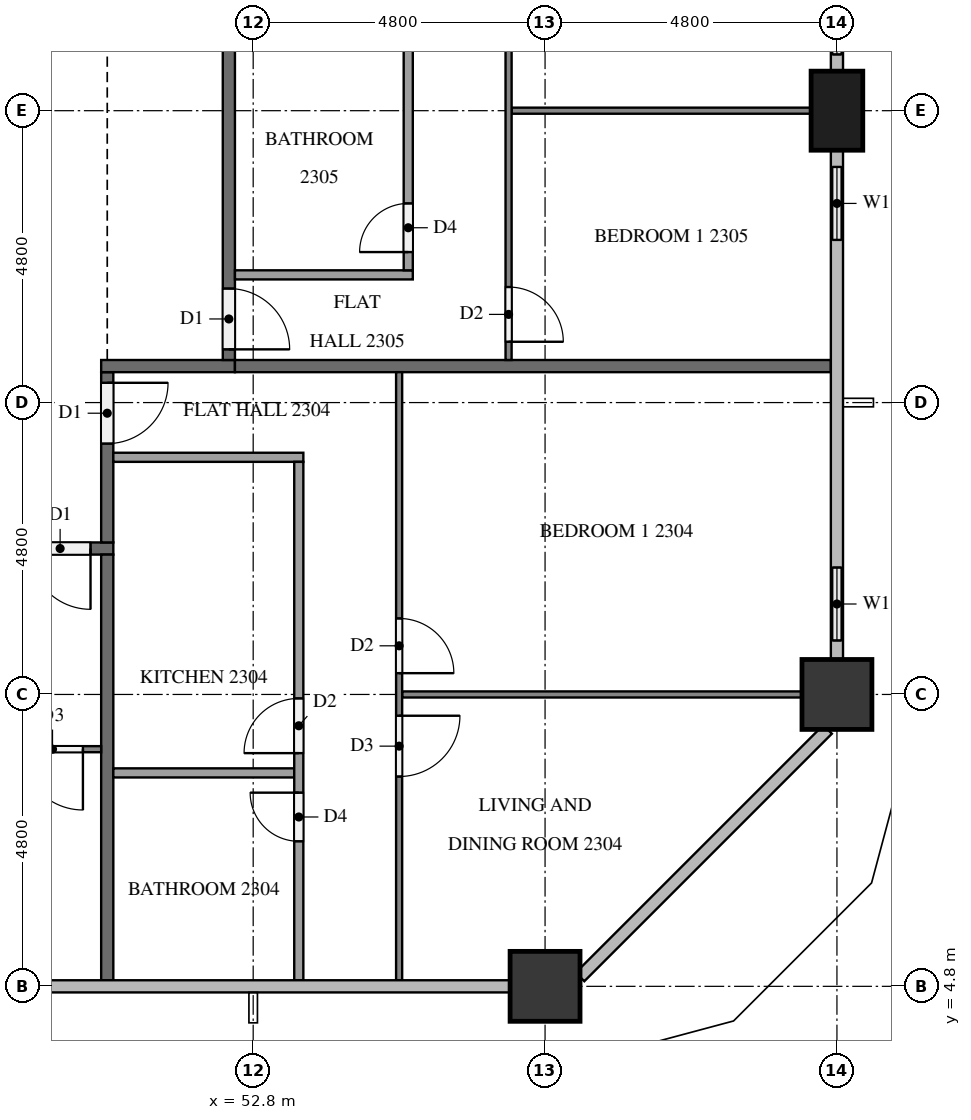
"""IFC4 building model, lengths in metres.
Left out: names, types, materials, properties, quantities, classifications, styles, units other than length and angle.
Written with IfcOpenShell. Run it as: python <this file> out.ifc"""

import sys

from ifc_helpers import new_model, si_unit, direction, frame, frame_2d, origin, origin_2d, place, context, subcontext, project, spatial, rectangle, extrude, element, fill, save


model = new_model("IFC4")
c1 = context("Model", 3, precision=1e-05, world=origin(), true_north=direction((0.0, 1.0)))
c2 = subcontext(c1, "Body", "Model", "MODEL_VIEW")
j1 = project(units=[si_unit("LENGTHUNIT", "METRE"), si_unit("PLANEANGLEUNIT", "RADIAN")], contexts=[c1])
p1 = place(None, origin())
s1 = spatial("IfcSite", under=j1, at=p1, CompositionType="ELEMENT")
p2 = place(p1, origin())
s2 = spatial("IfcBuilding", under=s1, at=p2, CompositionType="ELEMENT")
p3 = place(p2, frame((0.0, 0.0, 92.7)))
s3 = spatial("IfcBuildingStorey", under=s2, at=p3, CompositionType="ELEMENT", Elevation=92.7)
for number, where, z_axis, x_axis in (
    (1, (57.6, 4.8, 0.0), (0.0, 0.0, 1.0), (1.0, 0.0, 0.0)),
    (2, (62.4, 9.6, 0.0), (0.0, 0.0, 1.0), (1.0, 0.0, 0.0)),
):
    element("IfcColumn", number, at=place(p3, frame(where, z_axis=z_axis, x_axis=x_axis)), inside=s3, PredefinedType="COLUMN", context=c2, shape_type="SweptSolid", body=[
        extrude(rectangle(XDim=1.15, YDim=1.15, at=origin_2d()), origin(), (0.0, 0.0, 1.0), 3.2),
    ])
p4 = place(p3, frame((62.4, 19.2, 0.0), z_axis=(0.0, 0.0, 1.0), x_axis=(0.0, 1.0, 0.0)))
e3 = element("IfcColumn", 3, at=p4, inside=s3, PredefinedType="COLUMN", context=c2, shape_type="SweptSolid", body=[
    extrude(rectangle(XDim=1.3, YDim=0.85, at=origin_2d()), origin(), (0.0, 0.0, 1.0), 3.2),
])
p5 = place(p3, frame((62.4, 10.175, 0.0), z_axis=(0.0, 0.0, 1.0), x_axis=(0.0, 1.0, 0.0)))
e4 = element("IfcWall", 4, at=p5, inside=s3, PredefinedType="SOLIDWALL", context=c2, shape_type="SweptSolid", body=[
    extrude(rectangle(XDim=1.825, YDim=0.15, at=frame_2d((0.913, 0.0))), origin(), (0.0, 0.0, 1.0), 3.2),
])
p6 = place(p5, frame((0.312, 0.0, 0.9)))
e5 = element("IfcOpeningElement", 5, at=p6, cuts=e4, PredefinedType="OPENING", context=c2, shape_type="SweptSolid", body=[
    extrude(rectangle(XDim=1.2, YDim=1.4, at=frame_2d((0.6, 0.7))), frame((0.0, 0.085, 0.0), z_axis=(0.0, -1.0, 0.0), x_axis=(1.0, 0.0, 0.0)), (0.0, 0.0, 1.0), 0.17),
])
p7 = place(p3, frame((62.4, 16.8, 0.0), z_axis=(0.0, 0.0, 1.0), x_axis=(0.0, 1.0, 0.0)))
e6 = element("IfcWall", 6, at=p7, inside=s3, PredefinedType="SOLIDWALL", context=c2, shape_type="SweptSolid", body=[
    extrude(rectangle(XDim=1.75, YDim=0.15, at=frame_2d((0.875, 0.0))), origin(), (0.0, 0.0, 1.0), 3.2),
])
p8 = place(p7, frame((0.275, 0.0, 0.9)))
e7 = element("IfcOpeningElement", 7, at=p8, cuts=e6, PredefinedType="OPENING", context=c2, shape_type="SweptSolid", body=[
    extrude(rectangle(XDim=1.2, YDim=1.4, at=frame_2d((0.6, 0.7))), frame((0.0, 0.085, 0.0), z_axis=(0.0, -1.0, 0.0), x_axis=(1.0, 0.0, 0.0)), (0.0, 0.0, 1.0), 0.17),
])
p9 = place(p3, frame((62.4, 19.85, 0.0), z_axis=(0.0, 0.0, 1.0), x_axis=(0.0, 1.0, 0.0)))
e8 = element("IfcWall", 8, at=p9, inside=s3, PredefinedType="SOLIDWALL", context=c2, shape_type="SweptSolid", body=[
    extrude(rectangle(XDim=1.75, YDim=0.15, at=frame_2d((0.875, 0.0))), origin(), (0.0, 0.0, 1.0), 3.2),
])
p10 = place(p9, frame((0.275, 0.0, 0.9)))
e9 = element("IfcOpeningElement", 9, at=p10, cuts=e8, PredefinedType="OPENING", context=c2, shape_type="SweptSolid", body=[
    extrude(rectangle(XDim=1.2, YDim=1.4, at=frame_2d((0.6, 0.7))), frame((0.0, 0.085, 0.0), z_axis=(0.0, -1.0, 0.0), x_axis=(1.0, 0.0, 0.0)), (0.0, 0.0, 1.0), 0.17),
])
p11 = place(p3, frame((50.5, 12.0, 0.0), z_axis=(0.0, 0.0, 1.0), x_axis=(-1.0, 0.0, 0.0)))
e10 = element("IfcWall", 10, at=p11, inside=s3, PredefinedType="PARTITIONING", context=c2, shape_type="SweptSolid", body=[
    extrude(rectangle(XDim=38.6, YDim=0.2, at=frame_2d((19.3, 0.0))), origin(), (0.0, 0.0, 1.0), 3.2),
])
p12 = place(p11, frame((21.975, 0.0, 0.0)))
e11 = element("IfcOpeningElement", 11, at=p12, cuts=e10, PredefinedType="OPENING", context=c2, shape_type="SweptSolid", body=[
    extrude(rectangle(XDim=1.0, YDim=2.1, at=frame_2d((0.5, 1.05))), frame((0.0, 0.11, 0.0), z_axis=(0.0, -1.0, 0.0), x_axis=(1.0, 0.0, 0.0)), (0.0, 0.0, 1.0), 0.22),
])
p13 = place(p11, frame((7.575, 0.0, 0.0)))
e12 = element("IfcOpeningElement", 12, at=p13, cuts=e10, PredefinedType="OPENING", context=c2, shape_type="SweptSolid", body=[
    extrude(rectangle(XDim=1.0, YDim=2.1, at=frame_2d((0.5, 1.05))), frame((0.0, 0.11, 0.0), z_axis=(0.0, -1.0, 0.0), x_axis=(1.0, 0.0, 0.0)), (0.0, 0.0, 1.0), 0.22),
])
p14 = place(p11, frame((0.375, 0.0, 0.0)))
e13 = element("IfcOpeningElement", 13, at=p14, cuts=e10, PredefinedType="OPENING", context=c2, shape_type="SweptSolid", body=[
    extrude(rectangle(XDim=1.0, YDim=2.1, at=frame_2d((0.5, 1.05))), frame((0.0, 0.11, 0.0), z_axis=(0.0, -1.0, 0.0), x_axis=(1.0, 0.0, 0.0)), (0.0, 0.0, 1.0), 0.22),
])
p15 = place(p3, frame((50.4, 14.9, 0.0), z_axis=(0.0, 0.0, 1.0), x_axis=(0.0, -1.0, 0.0)))
e14 = element("IfcWall", 14, at=p15, inside=s3, PredefinedType="PARTITIONING", context=c2, shape_type="SweptSolid", body=[
    extrude(rectangle(XDim=2.8, YDim=0.2, at=frame_2d((1.4, 0.0))), origin(), (0.0, 0.0, 1.0), 3.2),
])
p16 = place(p15, frame((0.175, 0.0, 0.0)))
e15 = element("IfcOpeningElement", 15, at=p16, cuts=e14, PredefinedType="OPENING", context=c2, shape_type="SweptSolid", body=[
    extrude(rectangle(XDim=1.0, YDim=2.1, at=frame_2d((0.5, 1.05))), frame((0.0, 0.11, 0.0), z_axis=(0.0, -1.0, 0.0), x_axis=(1.0, 0.0, 0.0)), (0.0, 0.0, 1.0), 0.22),
])
p17 = place(p3, frame((50.3, 15.0, 0.0), z_axis=(0.0, 0.0, 1.0), x_axis=(1.0, 0.0, 0.0)))
e16 = element("IfcWall", 16, at=p17, inside=s3, PredefinedType="PARTITIONING", context=c2, shape_type="SweptSolid", body=[
    extrude(rectangle(XDim=2.2, YDim=0.2, at=frame_2d((1.1, 0.0))), origin(), (0.0, 0.0, 1.0), 3.2),
])
p18 = place(p3, frame((52.4, 37.7, 0.0), z_axis=(0.0, 0.0, 1.0), x_axis=(0.0, -1.0, 0.0)))
e17 = element("IfcWall", 17, at=p18, inside=s3, PredefinedType="PARTITIONING", context=c2, shape_type="SweptSolid", body=[
    extrude(rectangle(XDim=22.6, YDim=0.2, at=frame_2d((11.3, 0.0))), origin(), (0.0, 0.0, 1.0), 3.2),
])
p19 = place(p18, frame((21.425, 0.0, 0.0)))
e18 = element("IfcOpeningElement", 18, at=p19, cuts=e17, PredefinedType="OPENING", context=c2, shape_type="SweptSolid", body=[
    extrude(rectangle(XDim=1.0, YDim=2.1, at=frame_2d((0.5, 1.05))), frame((0.0, 0.11, 0.0), z_axis=(0.0, -1.0, 0.0), x_axis=(1.0, 0.0, 0.0)), (0.0, 0.0, 1.0), 0.22),
])
p20 = place(p18, frame((0.175, 0.0, 0.0)))
e19 = element("IfcOpeningElement", 19, at=p20, cuts=e17, PredefinedType="OPENING", context=c2, shape_type="SweptSolid", body=[
    extrude(rectangle(XDim=1.0, YDim=2.1, at=frame_2d((0.5, 1.05))), frame((0.0, 0.11, 0.0), z_axis=(0.0, -1.0, 0.0), x_axis=(1.0, 0.0, 0.0)), (0.0, 0.0, 1.0), 0.22),
])
p21 = place(p3, frame((50.4, 11.9, 0.0), z_axis=(0.0, 0.0, 1.0), x_axis=(0.0, -1.0, 0.0)))
e20 = element("IfcWall", 20, at=p21, inside=s3, PredefinedType="PARTITIONING", context=c2, shape_type="SweptSolid", body=[
    extrude(rectangle(XDim=7.0, YDim=0.2, at=frame_2d((3.5, 0.0))), origin(), (0.0, 0.0, 1.0), 3.2),
])
p22 = place(p3, frame((52.5, 15.0, 0.0), z_axis=(0.0, 0.0, 1.0), x_axis=(1.0, 0.0, 0.0)))
e21 = element("IfcWall", 21, at=p22, inside=s3, PredefinedType="PARTITIONING", context=c2, shape_type="SweptSolid", body=[
    extrude(rectangle(XDim=9.8, YDim=0.2, at=frame_2d((4.9, 0.0))), origin(), (0.0, 0.0, 1.0), 3.2),
])
p23 = place(p3, frame((50.3, 8.7, 0.0), z_axis=(0.0, 0.0, 1.0), x_axis=(-1.0, 0.0, 0.0)))
e22 = element("IfcWall", 22, at=p23, inside=s3, PredefinedType="PARTITIONING", context=c2, shape_type="SweptSolid", body=[
    extrude(rectangle(XDim=7.0, YDim=0.1, at=frame_2d((3.5, 0.0))), origin(), (0.0, 0.0, 1.0), 3.2),
])
p24 = place(p23, frame((0.3, 0.0, 0.0)))
e23 = element("IfcOpeningElement", 23, at=p24, cuts=e22, PredefinedType="OPENING", context=c2, shape_type="SweptSolid", body=[
    extrude(rectangle(XDim=1.0, YDim=2.1, at=frame_2d((0.5, 1.05))), frame((0.0, 0.06, 0.0), z_axis=(0.0, -1.0, 0.0), x_axis=(1.0, 0.0, 0.0)), (0.0, 0.0, 1.0), 0.12),
])
p25 = place(p3, frame((55.25, 9.6, 0.0), z_axis=(0.0, 0.0, 1.0), x_axis=(1.0, 0.0, 0.0)))
e24 = element("IfcWall", 24, at=p25, inside=s3, PredefinedType="PARTITIONING", context=c2, shape_type="SweptSolid", body=[
    extrude(rectangle(XDim=6.575, YDim=0.1, at=frame_2d((3.288, 0.0))), origin(), (0.0, 0.0, 1.0), 3.2),
])
p26 = place(p3, frame((55.2, 14.9, 0.0), z_axis=(0.0, 0.0, 1.0), x_axis=(0.0, -1.0, 0.0)))
e25 = element("IfcWall", 25, at=p26, inside=s3, PredefinedType="PARTITIONING", context=c2, shape_type="SweptSolid", body=[
    extrude(rectangle(XDim=10.0, YDim=0.1, at=frame_2d((5.0, 0.0))), origin(), (0.0, 0.0, 1.0), 3.2),
])
p27 = place(p26, frame((4.05, 0.0, 0.0)))
e26 = element("IfcOpeningElement", 26, at=p27, cuts=e25, PredefinedType="OPENING", context=c2, shape_type="SweptSolid", body=[
    extrude(rectangle(XDim=0.9, YDim=2.1, at=frame_2d((0.45, 1.05))), frame((0.0, 0.06, 0.0), z_axis=(0.0, -1.0, 0.0), x_axis=(1.0, 0.0, 0.0)), (0.0, 0.0, 1.0), 0.12),
])
p28 = place(p26, frame((5.65, 0.0, 0.0)))
e27 = element("IfcOpeningElement", 27, at=p28, cuts=e25, PredefinedType="OPENING", context=c2, shape_type="SweptSolid", body=[
    extrude(rectangle(XDim=1.0, YDim=2.1, at=frame_2d((0.5, 1.05))), frame((0.0, 0.06, 0.0), z_axis=(0.0, -1.0, 0.0), x_axis=(1.0, 0.0, 0.0)), (0.0, 0.0, 1.0), 0.12),
])
p29 = place(p3, frame((50.5, 8.31, 0.0), z_axis=(0.0, 0.0, 1.0), x_axis=(1.0, 0.0, 0.0)))
e28 = element("IfcWall", 28, at=p29, inside=s3, PredefinedType="PARTITIONING", context=c2, shape_type="SweptSolid", body=[
    extrude(rectangle(XDim=2.975, YDim=0.15, at=frame_2d((1.488, 0.0))), origin(), (0.0, 0.0, 1.0), 3.2),
])
p30 = place(p3, frame((50.5, 13.5, 0.0), z_axis=(0.0, 0.0, 1.0), x_axis=(1.0, 0.0, 0.0)))
e29 = element("IfcWall", 29, at=p30, inside=s3, PredefinedType="PARTITIONING", context=c2, shape_type="SweptSolid", body=[
    extrude(rectangle(XDim=3.125, YDim=0.15, at=frame_2d((1.562, 0.0))), origin(), (0.0, 0.0, 1.0), 3.2),
])
p31 = place(p3, frame((53.55, 4.9, 0.0), z_axis=(0.0, 0.0, 1.0), x_axis=(0.0, 1.0, 0.0)))
e30 = element("IfcWall", 30, at=p31, inside=s3, PredefinedType="PARTITIONING", context=c2, shape_type="SweptSolid", body=[
    extrude(rectangle(XDim=8.525, YDim=0.15, at=frame_2d((4.263, 0.0))), origin(), (0.0, 0.0, 1.0), 3.2),
])
p32 = place(p31, frame((3.735, 0.0, 0.0)))
e31 = element("IfcOpeningElement", 31, at=p32, cuts=e30, PredefinedType="OPENING", context=c2, shape_type="SweptSolid", body=[
    extrude(rectangle(XDim=0.9, YDim=2.1, at=frame_2d((0.45, 1.05))), frame((0.0, 0.085, 0.0), z_axis=(0.0, -1.0, 0.0), x_axis=(1.0, 0.0, 0.0)), (0.0, 0.0, 1.0), 0.17),
])
p33 = place(p31, frame((2.285, 0.0, 0.0)))
e32 = element("IfcOpeningElement", 32, at=p33, cuts=e30, PredefinedType="OPENING", context=c2, shape_type="SweptSolid", body=[
    extrude(rectangle(XDim=0.8, YDim=2.1, at=frame_2d((0.4, 1.05))), frame((0.0, 0.085, 0.0), z_axis=(0.0, -1.0, 0.0), x_axis=(1.0, 0.0, 0.0)), (0.0, 0.0, 1.0), 0.17),
])
p34 = place(p3, frame((57.05, 19.2, 0.0), z_axis=(0.0, 0.0, 1.0), x_axis=(1.0, 0.0, 0.0)))
e33 = element("IfcWall", 33, at=p34, inside=s3, PredefinedType="PARTITIONING", context=c2, shape_type="SweptSolid", body=[
    extrude(rectangle(XDim=4.925, YDim=0.1, at=frame_2d((2.462, 0.0))), origin(), (0.0, 0.0, 1.0), 3.2),
])
p35 = place(p3, frame((57.0, 28.7, 0.0), z_axis=(0.0, 0.0, 1.0), x_axis=(0.0, -1.0, 0.0)))
e34 = element("IfcWall", 34, at=p35, inside=s3, PredefinedType="PARTITIONING", context=c2, shape_type="SweptSolid", body=[
    extrude(rectangle(XDim=13.6, YDim=0.1, at=frame_2d((6.8, 0.0))), origin(), (0.0, 0.0, 1.0), 3.2),
])
p36 = place(p35, frame((12.4, 0.0, 0.0)))
e35 = element("IfcOpeningElement", 35, at=p36, cuts=e34, PredefinedType="OPENING", context=c2, shape_type="SweptSolid", body=[
    extrude(rectangle(XDim=0.9, YDim=2.1, at=frame_2d((0.45, 1.05))), frame((0.0, 0.06, 0.0), z_axis=(0.0, -1.0, 0.0), x_axis=(1.0, 0.0, 0.0)), (0.0, 0.0, 1.0), 0.12),
])
p37 = place(p35, frame((5.05, 0.0, 0.0)))
e36 = element("IfcOpeningElement", 36, at=p37, cuts=e34, PredefinedType="OPENING", context=c2, shape_type="SweptSolid", body=[
    extrude(rectangle(XDim=0.9, YDim=2.1, at=frame_2d((0.45, 1.05))), frame((0.0, 0.06, 0.0), z_axis=(0.0, -1.0, 0.0), x_axis=(1.0, 0.0, 0.0)), (0.0, 0.0, 1.0), 0.12),
])
p38 = place(p35, frame((3.35, 0.0, 0.0)))
e37 = element("IfcOpeningElement", 37, at=p38, cuts=e34, PredefinedType="OPENING", context=c2, shape_type="SweptSolid", body=[
    extrude(rectangle(XDim=1.0, YDim=2.1, at=frame_2d((0.5, 1.05))), frame((0.0, 0.06, 0.0), z_axis=(0.0, -1.0, 0.0), x_axis=(1.0, 0.0, 0.0)), (0.0, 0.0, 1.0), 0.12),
])
p39 = place(p3, frame((52.5, 16.5, 0.0), z_axis=(0.0, 0.0, 1.0), x_axis=(1.0, 0.0, 0.0)))
e38 = element("IfcWall", 38, at=p39, inside=s3, PredefinedType="PARTITIONING", context=c2, shape_type="SweptSolid", body=[
    extrude(rectangle(XDim=2.925, YDim=0.15, at=frame_2d((1.462, 0.0))), origin(), (0.0, 0.0, 1.0), 3.2),
])
p40 = place(p3, frame((55.35, 16.575, 0.0), z_axis=(0.0, 0.0, 1.0), x_axis=(0.0, 1.0, 0.0)))
e39 = element("IfcWall", 39, at=p40, inside=s3, PredefinedType="PARTITIONING", context=c2, shape_type="SweptSolid", body=[
    extrude(rectangle(XDim=12.125, YDim=0.15, at=frame_2d((6.062, 0.0))), origin(), (0.0, 0.0, 1.0), 3.2),
])
p41 = place(p40, frame((0.3, 0.0, 0.0)))
e40 = element("IfcOpeningElement", 40, at=p41, cuts=e39, PredefinedType="OPENING", context=c2, shape_type="SweptSolid", body=[
    extrude(rectangle(XDim=0.8, YDim=2.1, at=frame_2d((0.4, 1.05))), frame((0.0, 0.085, 0.0), z_axis=(0.0, -1.0, 0.0), x_axis=(1.0, 0.0, 0.0)), (0.0, 0.0, 1.0), 0.17),
])
p42 = place(p40, frame((5.404, 0.0, 0.0)))
e41 = element("IfcOpeningElement", 41, at=p42, cuts=e39, PredefinedType="OPENING", context=c2, shape_type="SweptSolid", body=[
    extrude(rectangle(XDim=0.8, YDim=2.1, at=frame_2d((0.4, 1.05))), frame((0.0, 0.085, 0.0), z_axis=(0.0, -1.0, 0.0), x_axis=(1.0, 0.0, 0.0)), (0.0, 0.0, 1.0), 0.17),
])
p43 = place(p40, frame((6.854, 0.0, 0.0)))
e42 = element("IfcOpeningElement", 42, at=p43, cuts=e39, PredefinedType="OPENING", context=c2, shape_type="SweptSolid", body=[
    extrude(rectangle(XDim=0.9, YDim=2.1, at=frame_2d((0.45, 1.05))), frame((0.0, 0.085, 0.0), z_axis=(0.0, -1.0, 0.0), x_axis=(1.0, 0.0, 0.0)), (0.0, 0.0, 1.0), 0.17),
])
p44 = place(p6, origin())
e43 = element("IfcWindow", 43, at=p44, inside=s3, PartitioningType="SINGLE_PANEL", PredefinedType="WINDOW", context=c2, shape_type="SweptSolid", body=[
    extrude(rectangle(XDim=1.2, YDim=1.4, at=frame_2d((0.6, 0.7))), frame((0.0, 0.03, 0.0), z_axis=(0.0, -1.0, 0.0), x_axis=(1.0, 0.0, 0.0)), (0.0, 0.0, 1.0), 0.06),
])
fill(e5, e43)
p45 = place(p8, origin())
e44 = element("IfcWindow", 44, at=p45, inside=s3, PartitioningType="SINGLE_PANEL", PredefinedType="WINDOW", context=c2, shape_type="SweptSolid", body=[
    extrude(rectangle(XDim=1.2, YDim=1.4, at=frame_2d((0.6, 0.7))), frame((0.0, 0.03, 0.0), z_axis=(0.0, -1.0, 0.0), x_axis=(1.0, 0.0, 0.0)), (0.0, 0.0, 1.0), 0.06),
])
fill(e7, e44)
p46 = place(p10, origin())
e45 = element("IfcWindow", 45, at=p46, inside=s3, PartitioningType="SINGLE_PANEL", PredefinedType="WINDOW", context=c2, shape_type="SweptSolid", body=[
    extrude(rectangle(XDim=1.2, YDim=1.4, at=frame_2d((0.6, 0.7))), frame((0.0, 0.03, 0.0), z_axis=(0.0, -1.0, 0.0), x_axis=(1.0, 0.0, 0.0)), (0.0, 0.0, 1.0), 0.06),
])
fill(e9, e45)
p47 = place(p14, origin())
e46 = element("IfcDoor", 46, at=p47, inside=s3, OperationType="SINGLE_SWING_LEFT", PredefinedType="DOOR", context=c2, shape_type="SweptSolid", body=[
    extrude(rectangle(XDim=1.0, YDim=2.1, at=frame_2d((0.5, 1.05))), frame((0.0, 0.025, 0.0), z_axis=(0.0, -1.0, 0.0), x_axis=(1.0, 0.0, 0.0)), (0.0, 0.0, 1.0), 0.05),
])
fill(e13, e46)
p48 = place(p16, origin())
e47 = element("IfcDoor", 47, at=p48, inside=s3, OperationType="SINGLE_SWING_LEFT", PredefinedType="DOOR", context=c2, shape_type="SweptSolid", body=[
    extrude(rectangle(XDim=1.0, YDim=2.1, at=frame_2d((0.5, 1.05))), frame((0.0, 0.025, 0.0), z_axis=(0.0, -1.0, 0.0), x_axis=(1.0, 0.0, 0.0)), (0.0, 0.0, 1.0), 0.05),
])
fill(e15, e47)
p49 = place(p19, origin())
e48 = element("IfcDoor", 48, at=p49, inside=s3, OperationType="SINGLE_SWING_RIGHT", PredefinedType="DOOR", context=c2, shape_type="SweptSolid", body=[
    extrude(rectangle(XDim=1.0, YDim=2.1, at=frame_2d((0.5, 1.05))), frame((0.0, 0.025, 0.0), z_axis=(0.0, -1.0, 0.0), x_axis=(1.0, 0.0, 0.0)), (0.0, 0.0, 1.0), 0.05),
])
fill(e18, e48)
p50 = place(p24, origin())
e49 = element("IfcDoor", 49, at=p50, inside=s3, OperationType="SINGLE_SWING_LEFT", PredefinedType="DOOR", context=c2, shape_type="SweptSolid", body=[
    extrude(rectangle(XDim=1.0, YDim=2.1, at=frame_2d((0.5, 1.05))), frame((0.0, 0.025, 0.0), z_axis=(0.0, -1.0, 0.0), x_axis=(1.0, 0.0, 0.0)), (0.0, 0.0, 1.0), 0.05),
])
fill(e23, e49)
p51 = place(p27, origin())
e50 = element("IfcDoor", 50, at=p51, inside=s3, OperationType="SINGLE_SWING_RIGHT", PredefinedType="DOOR", context=c2, shape_type="SweptSolid", body=[
    extrude(rectangle(XDim=0.9, YDim=2.1, at=frame_2d((0.45, 1.05))), frame((0.0, 0.025, 0.0), z_axis=(0.0, -1.0, 0.0), x_axis=(1.0, 0.0, 0.0)), (0.0, 0.0, 1.0), 0.05),
])
fill(e26, e50)
p52 = place(p28, origin())
e51 = element("IfcDoor", 51, at=p52, inside=s3, OperationType="SINGLE_SWING_LEFT", PredefinedType="DOOR", context=c2, shape_type="SweptSolid", body=[
    extrude(rectangle(XDim=1.0, YDim=2.1, at=frame_2d((0.5, 1.05))), frame((0.0, 0.025, 0.0), z_axis=(0.0, -1.0, 0.0), x_axis=(1.0, 0.0, 0.0)), (0.0, 0.0, 1.0), 0.05),
])
fill(e27, e51)
p53 = place(p32, origin())
e52 = element("IfcDoor", 52, at=p53, inside=s3, OperationType="SINGLE_SWING_LEFT", PredefinedType="DOOR", context=c2, shape_type="SweptSolid", body=[
    extrude(rectangle(XDim=0.9, YDim=2.1, at=frame_2d((0.45, 1.05))), frame((0.0, 0.025, 0.0), z_axis=(0.0, -1.0, 0.0), x_axis=(1.0, 0.0, 0.0)), (0.0, 0.0, 1.0), 0.05),
])
fill(e31, e52)
p54 = place(p33, origin())
e53 = element("IfcDoor", 53, at=p54, inside=s3, OperationType="SINGLE_SWING_RIGHT", PredefinedType="DOOR", context=c2, shape_type="SweptSolid", body=[
    extrude(rectangle(XDim=0.8, YDim=2.1, at=frame_2d((0.4, 1.05))), frame((0.0, 0.025, 0.0), z_axis=(0.0, -1.0, 0.0), x_axis=(1.0, 0.0, 0.0)), (0.0, 0.0, 1.0), 0.05),
])
fill(e32, e53)
p55 = place(p36, origin())
e54 = element("IfcDoor", 54, at=p55, inside=s3, OperationType="SINGLE_SWING_RIGHT", PredefinedType="DOOR", context=c2, shape_type="SweptSolid", body=[
    extrude(rectangle(XDim=0.9, YDim=2.1, at=frame_2d((0.45, 1.05))), frame((0.0, 0.025, 0.0), z_axis=(0.0, -1.0, 0.0), x_axis=(1.0, 0.0, 0.0)), (0.0, 0.0, 1.0), 0.05),
])
fill(e35, e54)
p56 = place(p41, origin())
e55 = element("IfcDoor", 55, at=p56, inside=s3, OperationType="SINGLE_SWING_LEFT", PredefinedType="DOOR", context=c2, shape_type="SweptSolid", body=[
    extrude(rectangle(XDim=0.8, YDim=2.1, at=frame_2d((0.4, 1.05))), frame((0.0, 0.025, 0.0), z_axis=(0.0, -1.0, 0.0), x_axis=(1.0, 0.0, 0.0)), (0.0, 0.0, 1.0), 0.05),
])
fill(e40, e55)
save(model, sys.argv[1])
